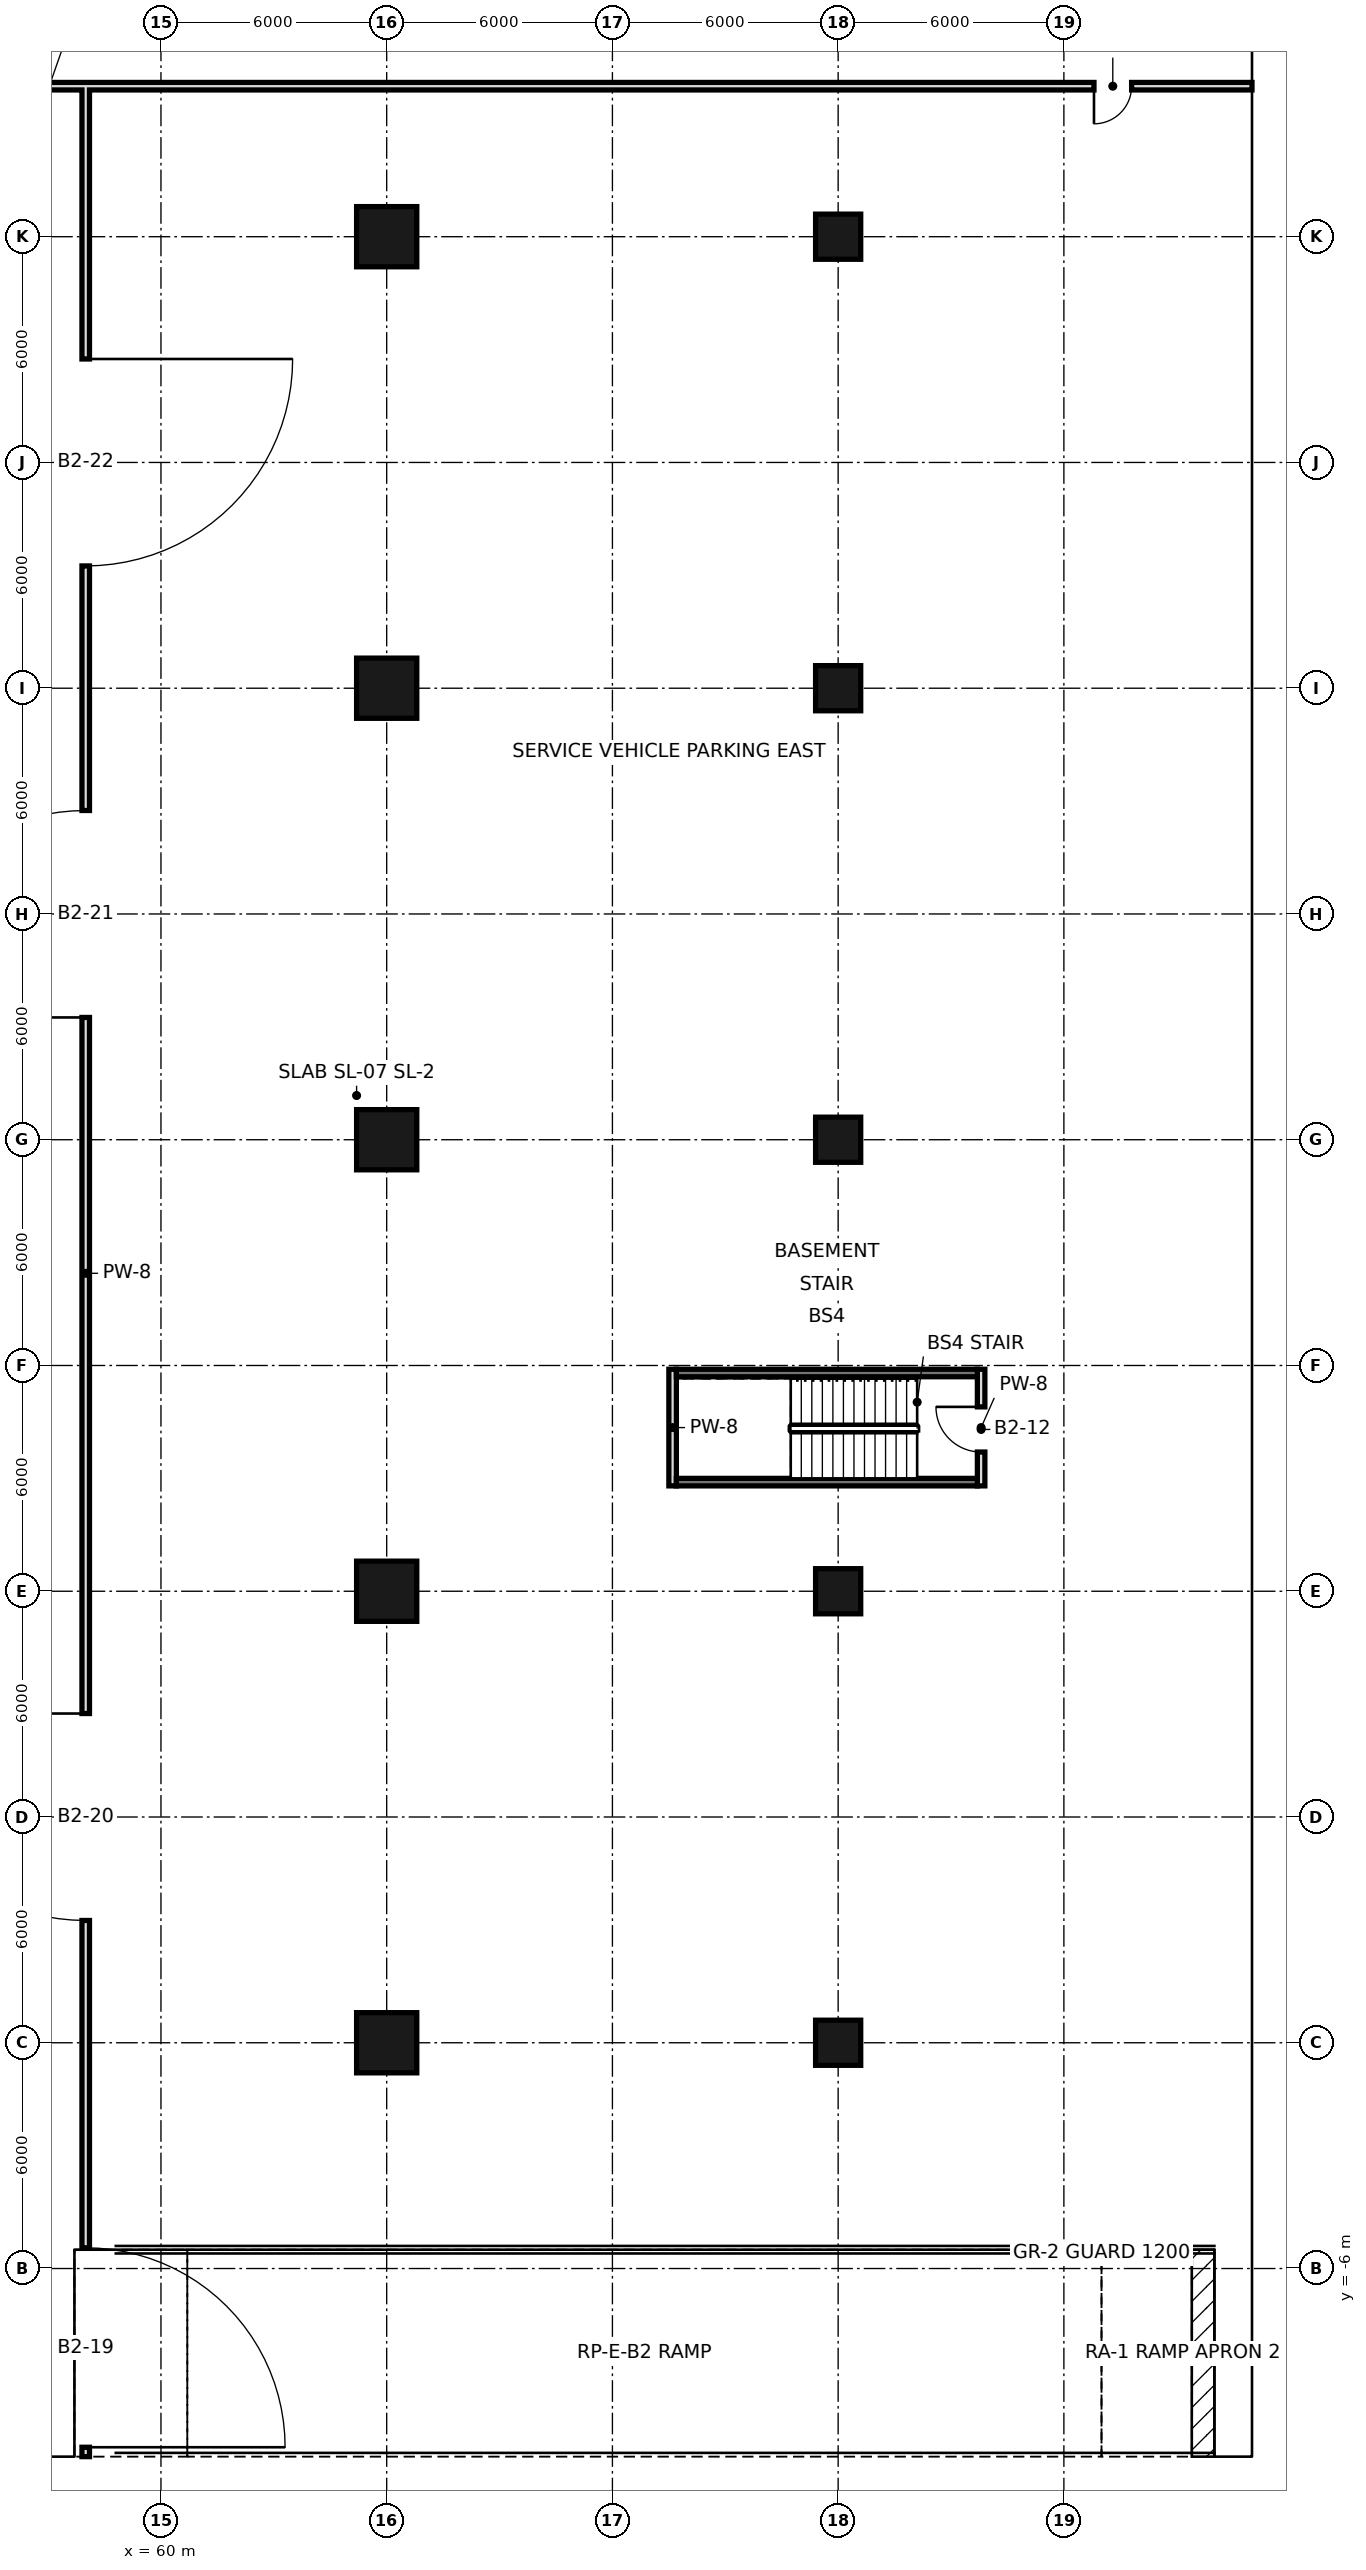
"""IFC4 building model, lengths in metres.
Left out: names, types, materials, properties, quantities, classifications, styles, units other than length and angle.
Written with IfcOpenShell. Run it as: python <this file> out.ifc"""

import sys

from ifc_helpers import new_model, si_unit, direction, frame, frame_2d, origin, origin_2d, place, context, subcontext, project, spatial, rectangle, extrude, element, fill, save


model = new_model("IFC4")
c1 = context("Model", 3, precision=1e-05, world=origin(), true_north=direction((0.0, 1.0)))
c2 = subcontext(c1, "Body", "Model", "MODEL_VIEW")
j1 = project(units=[si_unit("LENGTHUNIT", "METRE"), si_unit("PLANEANGLEUNIT", "RADIAN")], contexts=[c1])
p1 = place(None, origin())
s1 = spatial("IfcSite", under=j1, at=p1, CompositionType="ELEMENT")
p2 = place(p1, origin())
s2 = spatial("IfcBuilding", under=s1, at=p2, CompositionType="ELEMENT")
p3 = place(p2, frame((0.0, 0.0, -13.5)))
s3 = spatial("IfcBuildingStorey", under=s2, at=p3, CompositionType="ELEMENT", Elevation=-13.5)
p4 = place(p3, frame((89.5, -12.0, -26.5), z_axis=(0.0, 0.0, 1.0), x_axis=(0.0, 1.0, 0.0)))
e1 = element("IfcWall", 1, at=p4, inside=s3, PredefinedType="SOLIDWALL", context=c2, shape_type="SweptSolid", body=[
    extrude(rectangle(XDim=72.0, YDim=1.0, at=frame_2d((36.0, 0.0))), origin(), (0.0, 0.0, 1.0), 39.64),
])
p5 = place(p3, frame((-23.0, -11.5, -26.5), z_axis=(0.0, 0.0, 1.0), x_axis=(1.0, 0.0, 0.0)))
e2 = element("IfcWall", 2, at=p5, inside=s3, PredefinedType="SOLIDWALL", context=c2, shape_type="SweptSolid", body=[
    extrude(rectangle(XDim=112.0, YDim=1.0, at=frame_2d((56.0, 0.0))), origin(), (0.0, 0.0, 1.0), 39.64),
])
p6 = place(p2, frame((0.0, 0.0, -9.0)))
s4 = spatial("IfcBuildingStorey", under=s2, at=p6, CompositionType="ELEMENT", Elevation=-9.0)
for number, where, z_axis, x_axis in (
    (3, (66.0, 0.0, 0.0), (0.0, 0.0, 1.0), (1.0, 0.0, 0.0)),
    (4, (66.0, 12.0, 0.0), (0.0, 0.0, 1.0), (1.0, 0.0, 0.0)),
    (5, (66.0, 24.0, 0.0), (0.0, 0.0, 1.0), (1.0, 0.0, 0.0)),
    (6, (66.0, 36.0, 0.0), (0.0, 0.0, 1.0), (1.0, 0.0, 0.0)),
    (7, (66.0, 48.0, 0.0), (0.0, 0.0, 1.0), (1.0, 0.0, 0.0)),
):
    element("IfcColumn", number, at=place(p6, frame(where, z_axis=z_axis, x_axis=x_axis)), inside=s4, PredefinedType="COLUMN", context=c2, shape_type="SweptSolid", body=[
        extrude(rectangle(XDim=1.6, YDim=1.6, at=origin_2d()), origin(), (0.0, 0.0, 1.0), 4.5),
    ])
for number, where, z_axis, x_axis in (
    (8, (78.0, 0.0, 0.0), (0.0, 0.0, 1.0), (1.0, 0.0, 0.0)),
    (9, (78.0, 12.0, 0.0), (0.0, 0.0, 1.0), (1.0, 0.0, 0.0)),
    (10, (78.0, 24.0, 0.0), (0.0, 0.0, 1.0), (1.0, 0.0, 0.0)),
    (11, (78.0, 36.0, 0.0), (0.0, 0.0, 1.0), (1.0, 0.0, 0.0)),
    (12, (78.0, 48.0, 0.0), (0.0, 0.0, 1.0), (1.0, 0.0, 0.0)),
):
    element("IfcColumn", number, at=place(p6, frame(where, z_axis=z_axis, x_axis=x_axis)), inside=s4, PredefinedType="COLUMN", context=c2, shape_type="SweptSolid", body=[
        extrude(rectangle(XDim=1.2, YDim=1.2, at=origin_2d()), origin(), (0.0, 0.0, 1.0), 4.5),
    ])
p7 = place(p6, frame((58.0, -11.0, 0.0), z_axis=(0.0, 0.0, 1.0), x_axis=(0.0, 1.0, 0.0)))
e13 = element("IfcWall", 13, at=p7, inside=s4, PredefinedType="SOLIDWALL", context=c2, shape_type="SweptSolid", body=[
    extrude(rectangle(XDim=62.9, YDim=0.2, at=frame_2d((31.45, 0.0))), origin(), (0.0, 0.0, 1.0), 3.04),
])
p8 = place(p7, frame((0.25, 0.0, 0.0)))
e14 = element("IfcOpeningElement", 14, at=p8, cuts=e13, PredefinedType="OPENING", context=c2, shape_type="SweptSolid", body=[
    extrude(rectangle(XDim=5.3, YDim=2.4, at=frame_2d((2.65, 1.2))), frame((0.0, 0.11, 0.0), z_axis=(0.0, -1.0, 0.0), x_axis=(1.0, 0.0, 0.0)), (0.0, 0.0, 1.0), 0.22),
])
p9 = place(p7, frame((14.25, 0.0, 0.0)))
e15 = element("IfcOpeningElement", 15, at=p9, cuts=e13, PredefinedType="OPENING", context=c2, shape_type="SweptSolid", body=[
    extrude(rectangle(XDim=5.5, YDim=2.4, at=frame_2d((2.75, 1.2))), frame((0.0, 0.11, 0.0), z_axis=(0.0, -1.0, 0.0), x_axis=(1.0, 0.0, 0.0)), (0.0, 0.0, 1.0), 0.22),
])
p10 = place(p7, frame((38.25, 0.0, 0.0)))
e16 = element("IfcOpeningElement", 16, at=p10, cuts=e13, PredefinedType="OPENING", context=c2, shape_type="SweptSolid", body=[
    extrude(rectangle(XDim=5.5, YDim=2.4, at=frame_2d((2.75, 1.2))), frame((0.0, 0.11, 0.0), z_axis=(0.0, -1.0, 0.0), x_axis=(1.0, 0.0, 0.0)), (0.0, 0.0, 1.0), 0.22),
])
p11 = place(p7, frame((50.25, 0.0, 0.0)))
e17 = element("IfcOpeningElement", 17, at=p11, cuts=e13, PredefinedType="OPENING", context=c2, shape_type="SweptSolid", body=[
    extrude(rectangle(XDim=5.5, YDim=2.4, at=frame_2d((2.75, 1.2))), frame((0.0, 0.11, 0.0), z_axis=(0.0, -1.0, 0.0), x_axis=(1.0, 0.0, 0.0)), (0.0, 0.0, 1.0), 0.22),
])
p12 = place(p6, frame((73.6, 14.8, 0.0), z_axis=(0.0, 0.0, 1.0), x_axis=(0.0, 1.0, 0.0)))
e18 = element("IfcWall", 18, at=p12, inside=s4, PredefinedType="SOLIDWALL", context=c2, shape_type="SweptSolid", body=[
    extrude(rectangle(XDim=3.1, YDim=0.2, at=frame_2d((1.55, 0.0))), origin(), (0.0, 0.0, 1.0), 4.14),
])
p13 = place(p6, frame((81.8, 14.8, 0.0), z_axis=(0.0, 0.0, 1.0), x_axis=(0.0, 1.0, 0.0)))
e19 = element("IfcWall", 19, at=p13, inside=s4, PredefinedType="SOLIDWALL", context=c2, shape_type="SweptSolid", body=[
    extrude(rectangle(XDim=3.1, YDim=0.2, at=frame_2d((1.55, 0.0))), origin(), (0.0, 0.0, 1.0), 4.14),
])
p14 = place(p13, frame((0.9, 0.0, 0.0)))
e20 = element("IfcOpeningElement", 20, at=p14, cuts=e19, PredefinedType="OPENING", context=c2, shape_type="SweptSolid", body=[
    extrude(rectangle(XDim=1.2, YDim=2.4, at=frame_2d((0.6, 1.2))), frame((0.0, 0.11, 0.0), z_axis=(0.0, -1.0, 0.0), x_axis=(1.0, 0.0, 0.0)), (0.0, 0.0, 1.0), 0.22),
])
for number, where, z_axis, x_axis in (
    (21, (73.7, 14.9, 0.0), (0.0, 0.0, 1.0), (1.0, 0.0, 0.0)),
    (22, (73.7, 17.8, 0.0), (0.0, 0.0, 1.0), (1.0, 0.0, 0.0)),
):
    element("IfcWall", number, at=place(p6, frame(where, z_axis=z_axis, x_axis=x_axis)), inside=s4, PredefinedType="SOLIDWALL", context=c2, shape_type="SweptSolid", body=[
        extrude(rectangle(XDim=8.0, YDim=0.2, at=frame_2d((4.0, 0.0))), origin(), (0.0, 0.0, 1.0), 4.14),
    ])
p15 = place(p6, frame((-23.0, 52.0, 0.0), z_axis=(0.0, 0.0, 1.0), x_axis=(1.0, 0.0, 0.0)))
e23 = element("IfcWall", 23, at=p15, inside=s4, PredefinedType="SOLIDWALL", context=c2, shape_type="SweptSolid", body=[
    extrude(rectangle(XDim=112.0, YDim=0.2, at=frame_2d((56.0, 0.0))), origin(), (0.0, 0.0, 1.0), 4.14),
])
p16 = place(p15, frame((3.25, 0.0, 0.0)))
e24 = element("IfcOpeningElement", 24, at=p16, cuts=e23, PredefinedType="OPENING", context=c2, shape_type="SweptSolid", body=[
    extrude(rectangle(XDim=1.0, YDim=2.4, at=frame_2d((0.5, 1.2))), frame((0.0, 0.11, 0.0), z_axis=(0.0, -1.0, 0.0), x_axis=(1.0, 0.0, 0.0)), (0.0, 0.0, 1.0), 0.22),
])
p17 = place(p15, frame((107.8, 0.0, 0.0)))
e25 = element("IfcOpeningElement", 25, at=p17, cuts=e23, PredefinedType="OPENING", context=c2, shape_type="SweptSolid", body=[
    extrude(rectangle(XDim=1.0, YDim=2.4, at=frame_2d((0.5, 1.2))), frame((0.0, 0.11, 0.0), z_axis=(0.0, -1.0, 0.0), x_axis=(1.0, 0.0, 0.0)), (0.0, 0.0, 1.0), 0.22),
])
p18 = place(p14, frame((1.2, 0.0, 0.0), z_axis=(0.0, 0.0, 1.0), x_axis=(-1.0, 0.0, 0.0)))
e26 = element("IfcDoor", 26, at=p18, inside=s4, OperationType="SINGLE_SWING_LEFT", PredefinedType="DOOR", context=c2, shape_type="SweptSolid", body=[
    extrude(rectangle(XDim=1.2, YDim=2.4, at=frame_2d((0.6, 1.2))), frame((0.0, 0.025, 0.0), z_axis=(0.0, -1.0, 0.0), x_axis=(1.0, 0.0, 0.0)), (0.0, 0.0, 1.0), 0.05),
])
fill(e20, e26)
p19 = place(p17, frame((1.0, 0.0, 0.0), z_axis=(0.0, 0.0, 1.0), x_axis=(-1.0, 0.0, 0.0)))
e27 = element("IfcDoor", 27, at=p19, inside=s4, OperationType="SINGLE_SWING_RIGHT", PredefinedType="DOOR", context=c2, shape_type="SweptSolid", body=[
    extrude(rectangle(XDim=1.0, YDim=2.4, at=frame_2d((0.5, 1.2))), frame((0.0, 0.025, 0.0), z_axis=(0.0, -1.0, 0.0), x_axis=(1.0, 0.0, 0.0)), (0.0, 0.0, 1.0), 0.05),
])
fill(e25, e27)
p20 = place(p8, frame((5.3, 0.0, 0.0), z_axis=(0.0, 0.0, 1.0), x_axis=(-1.0, 0.0, 0.0)))
e28 = element("IfcDoor", 28, at=p20, inside=s4, OperationType="SINGLE_SWING_RIGHT", PredefinedType="DOOR", context=c2, shape_type="SweptSolid", body=[
    extrude(rectangle(XDim=5.3, YDim=2.4, at=frame_2d((2.65, 1.2))), frame((0.0, 0.025, 0.0), z_axis=(0.0, -1.0, 0.0), x_axis=(1.0, 0.0, 0.0)), (0.0, 0.0, 1.0), 0.05),
])
fill(e14, e28)
p21 = place(p9, frame((5.5, 0.0, 0.0), z_axis=(0.0, 0.0, 1.0), x_axis=(-1.0, 0.0, 0.0)))
e29 = element("IfcDoor", 29, at=p21, inside=s4, OperationType="SINGLE_SWING_LEFT", PredefinedType="DOOR", context=c2, shape_type="SweptSolid", body=[
    extrude(rectangle(XDim=5.5, YDim=2.4, at=frame_2d((2.75, 1.2))), frame((0.0, 0.025, 0.0), z_axis=(0.0, -1.0, 0.0), x_axis=(1.0, 0.0, 0.0)), (0.0, 0.0, 1.0), 0.05),
])
fill(e15, e29)
p22 = place(p10, origin())
e30 = element("IfcDoor", 30, at=p22, inside=s4, OperationType="SINGLE_SWING_LEFT", PredefinedType="DOOR", context=c2, shape_type="SweptSolid", body=[
    extrude(rectangle(XDim=5.5, YDim=2.4, at=frame_2d((2.75, 1.2))), frame((0.0, 0.025, 0.0), z_axis=(0.0, -1.0, 0.0), x_axis=(1.0, 0.0, 0.0)), (0.0, 0.0, 1.0), 0.05),
])
fill(e16, e30)
p23 = place(p11, origin())
e31 = element("IfcDoor", 31, at=p23, inside=s4, OperationType="SINGLE_SWING_RIGHT", PredefinedType="DOOR", context=c2, shape_type="SweptSolid", body=[
    extrude(rectangle(XDim=5.5, YDim=2.4, at=frame_2d((2.75, 1.2))), frame((0.0, 0.025, 0.0), z_axis=(0.0, -1.0, 0.0), x_axis=(1.0, 0.0, 0.0)), (0.0, 0.0, 1.0), 0.05),
])
fill(e17, e31)
save(model, sys.argv[1])
